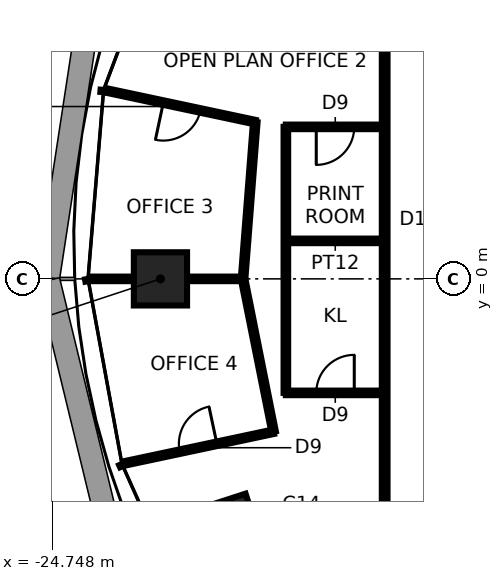
"""IFC4 building model, lengths in metres.
Left out: names, types, materials, properties, quantities, classifications, styles, units other than length and angle.
Written with IfcOpenShell. Run it as: python <this file> out.ifc"""

import sys

from ifc_helpers import new_model, si_unit, direction, frame, frame_2d, origin, origin_2d, place, context, subcontext, project, spatial, rectangle, extrude, element, fill, save


model = new_model("IFC4")
c1 = context("Model", 3, precision=1e-05, world=origin(), true_north=direction((0.0, 1.0)))
c2 = subcontext(c1, "Body", "Model", "MODEL_VIEW")
j1 = project(units=[si_unit("LENGTHUNIT", "METRE"), si_unit("PLANEANGLEUNIT", "RADIAN")], contexts=[c1])
p1 = place(None, origin())
s1 = spatial("IfcSite", under=j1, at=p1, CompositionType="ELEMENT")
p2 = place(p1, origin())
s2 = spatial("IfcBuilding", under=s1, at=p2, CompositionType="ELEMENT")
p3 = place(p2, frame((0.0, 0.0, 176.0)))
s3 = spatial("IfcBuildingStorey", under=s2, at=p3, CompositionType="ELEMENT", Elevation=176.0)
for number, where, z_axis, x_axis in (
    (1, (-20.808, 6.761, 0.0), (0.0, 0.0, 1.0), (-0.951, 0.309, 0.0)),
    (2, (-21.9, 0.0, 0.0), (0.0, 0.0, 1.0), (-1.0, 0.0, 0.0)),
    (3, (-20.109, -6.534, 0.0), (0.0, 0.0, 1.0), (-0.951, -0.309, 0.0)),
):
    element("IfcColumn", number, at=place(p3, frame(where, z_axis=z_axis, x_axis=x_axis)), inside=s3, PredefinedType="COLUMN", context=c2, shape_type="SweptSolid", body=[
        extrude(rectangle(XDim=1.4, YDim=1.4, at=origin_2d()), origin(), (0.0, 0.0, 1.0), 3.9),
    ])
p4 = place(p3, frame((-18.922, -4.022, 0.0), z_axis=(0.0, 0.0, 1.0), x_axis=(-0.195944435797, 0.980614999926, 0.0)))
e4 = element("IfcWall", 4, at=p4, inside=s3, PredefinedType="PARTITIONING", context=c2, shape_type="SweptSolid", body=[
    extrude(rectangle(XDim=4.102, YDim=0.12, at=frame_2d((2.051, 0.0))), origin(), (0.0, 0.0, 1.0), 3.74),
])
p5 = place(p3, frame((-18.6, -3.0, 0.0), z_axis=(0.0, 0.0, 1.0), x_axis=(1.0, 0.0, 0.0)))
e5 = element("IfcWall", 5, at=p5, inside=s3, PredefinedType="PARTITIONING", context=c2, shape_type="SweptSolid", body=[
    extrude(rectangle(XDim=2.6, YDim=0.12, at=frame_2d((1.3, 0.0))), origin(), (0.0, 0.0, 1.0), 3.74),
])
p6 = place(p5, frame((0.8, 0.0, 0.0)))
e6 = element("IfcOpeningElement", 6, at=p6, cuts=e5, PredefinedType="OPENING", context=c2, shape_type="SweptSolid", body=[
    extrude(rectangle(XDim=1.0, YDim=2.4, at=frame_2d((0.5, 1.2))), frame((0.0, 0.07, 0.0), z_axis=(0.0, -1.0, 0.0), x_axis=(1.0, 0.0, 0.0)), (0.0, 0.0, 1.0), 0.14),
])
p7 = place(p3, frame((-22.835, -4.854, 0.0), z_axis=(0.0, 0.0, 1.0), x_axis=(0.978152955943, 0.207886494942, 0.0)))
e7 = element("IfcWall", 7, at=p7, inside=s3, PredefinedType="PARTITIONING", context=c2, shape_type="SweptSolid", body=[
    extrude(rectangle(XDim=4.0, YDim=0.12, at=frame_2d((2.0, 0.0))), origin(), (0.0, 0.0, 1.0), 3.74),
])
p8 = place(p7, frame((1.474, 0.0, 0.0)))
e8 = element("IfcOpeningElement", 8, at=p8, cuts=e7, PredefinedType="OPENING", context=c2, shape_type="SweptSolid", body=[
    extrude(rectangle(XDim=1.0, YDim=2.4, at=frame_2d((0.5, 1.2))), frame((0.0, 0.07, 0.0), z_axis=(0.0, -1.0, 0.0), x_axis=(1.0, 0.0, 0.0)), (0.0, 0.0, 1.0), 0.14),
])
p9 = place(p3, frame((-16.0, 4.0, 0.0), z_axis=(0.0, 0.0, 1.0), x_axis=(-1.0, 0.0, 0.0)))
e9 = element("IfcWall", 9, at=p9, inside=s3, PredefinedType="PARTITIONING", context=c2, shape_type="SweptSolid", body=[
    extrude(rectangle(XDim=2.6, YDim=0.12, at=frame_2d((1.3, 0.0))), origin(), (0.0, 0.0, 1.0), 3.74),
])
p10 = place(p9, frame((0.8, 0.0, 0.0)))
e10 = element("IfcOpeningElement", 10, at=p10, cuts=e9, PredefinedType="OPENING", context=c2, shape_type="SweptSolid", body=[
    extrude(rectangle(XDim=1.0, YDim=2.4, at=frame_2d((0.5, 1.2))), frame((0.0, 0.07, 0.0), z_axis=(0.0, -1.0, 0.0), x_axis=(1.0, 0.0, 0.0)), (0.0, 0.0, 1.0), 0.14),
])
p11 = place(p3, frame((-19.405, 4.125, 0.0), z_axis=(0.0, 0.0, 1.0), x_axis=(-0.978140543132, 0.207944891454, 0.0)))
e11 = element("IfcWall", 11, at=p11, inside=s3, PredefinedType="PARTITIONING", context=c2, shape_type="SweptSolid", body=[
    extrude(rectangle(XDim=4.0, YDim=0.12, at=frame_2d((2.0, 0.0))), origin(), (0.0, 0.0, 1.0), 3.74),
])
p12 = place(p11, frame((1.474, 0.0, 0.0)))
e12 = element("IfcOpeningElement", 12, at=p12, cuts=e11, PredefinedType="OPENING", context=c2, shape_type="SweptSolid", body=[
    extrude(rectangle(XDim=1.0, YDim=2.4, at=frame_2d((0.5, 1.2))), frame((0.0, 0.07, 0.0), z_axis=(0.0, -1.0, 0.0), x_axis=(1.0, 0.0, 0.0)), (0.0, 0.0, 1.0), 0.14),
])
p13 = place(p3, frame((-19.726, 0.0, 0.0), z_axis=(0.0, 0.0, 1.0), x_axis=(0.077720864456, 0.996975158782, 0.0)))
e13 = element("IfcWall", 13, at=p13, inside=s3, PredefinedType="PARTITIONING", context=c2, shape_type="SweptSolid", body=[
    extrude(rectangle(XDim=4.137, YDim=0.12, at=frame_2d((2.068, 0.0))), origin(), (0.0, 0.0, 1.0), 3.74),
])
p14 = place(p3, frame((-18.6, 1.0, 0.0), z_axis=(0.0, 0.0, 1.0), x_axis=(1.0, 0.0, 0.0)))
e14 = element("IfcWall", 14, at=p14, inside=s3, PredefinedType="PARTITIONING", context=c2, shape_type="SweptSolid", body=[
    extrude(rectangle(XDim=2.6, YDim=0.12, at=frame_2d((1.3, 0.0))), origin(), (0.0, 0.0, 1.0), 3.74),
])
p15 = place(p3, frame((-18.6, 4.0, 0.0), z_axis=(0.0, 0.0, 1.0), x_axis=(0.0, -1.0, 0.0)))
e15 = element("IfcWall", 15, at=p15, inside=s3, PredefinedType="PARTITIONING", context=c2, shape_type="SweptSolid", body=[
    extrude(rectangle(XDim=7.0, YDim=0.12, at=frame_2d((3.5, 0.0))), origin(), (0.0, 0.0, 1.0), 3.74),
])
p16 = place(p3, frame((-19.726, 0.0, 0.0), z_axis=(0.0, 0.0, 1.0), x_axis=(-1.0, 0.0, 0.0)))
e16 = element("IfcWall", 16, at=p16, inside=s3, PredefinedType="PARTITIONING", context=c2, shape_type="SweptSolid", body=[
    extrude(rectangle(XDim=4.0, YDim=0.12, at=frame_2d((2.0, 0.0))), origin(), (0.0, 0.0, 1.0), 3.04),
])
p17 = place(p3, frame((-16.0, 11.3, 0.0), z_axis=(0.0, 0.0, 1.0), x_axis=(0.0, -1.0, 0.0)))
e17 = element("IfcWall", 17, at=p17, inside=s3, PredefinedType="PARTITIONING", context=c2, shape_type="SweptSolid", body=[
    extrude(rectangle(XDim=22.6, YDim=0.15, at=frame_2d((11.3, 0.0))), origin(), (0.0, 0.0, 1.0), 3.74),
])
p18 = place(p12, origin())
e18 = element("IfcDoor", 18, at=p18, inside=s3, OperationType="SINGLE_SWING_RIGHT", PredefinedType="DOOR", context=c2, shape_type="SweptSolid", body=[
    extrude(rectangle(XDim=1.0, YDim=2.4, at=frame_2d((0.5, 1.2))), frame((0.0, 0.025, 0.0), z_axis=(0.0, -1.0, 0.0), x_axis=(1.0, 0.0, 0.0)), (0.0, 0.0, 1.0), 0.05),
])
fill(e12, e18)
p19 = place(p8, origin())
e19 = element("IfcDoor", 19, at=p19, inside=s3, OperationType="SINGLE_SWING_RIGHT", PredefinedType="DOOR", context=c2, shape_type="SweptSolid", body=[
    extrude(rectangle(XDim=1.0, YDim=2.4, at=frame_2d((0.5, 1.2))), frame((0.0, 0.025, 0.0), z_axis=(0.0, -1.0, 0.0), x_axis=(1.0, 0.0, 0.0)), (0.0, 0.0, 1.0), 0.05),
])
fill(e8, e19)
p20 = place(p6, origin())
e20 = element("IfcDoor", 20, at=p20, inside=s3, OperationType="SINGLE_SWING_RIGHT", PredefinedType="DOOR", context=c2, shape_type="SweptSolid", body=[
    extrude(rectangle(XDim=1.0, YDim=2.4, at=frame_2d((0.5, 1.2))), frame((0.0, 0.025, 0.0), z_axis=(0.0, -1.0, 0.0), x_axis=(1.0, 0.0, 0.0)), (0.0, 0.0, 1.0), 0.05),
])
fill(e6, e20)
p21 = place(p10, origin())
e21 = element("IfcDoor", 21, at=p21, inside=s3, OperationType="SINGLE_SWING_RIGHT", PredefinedType="DOOR", context=c2, shape_type="SweptSolid", body=[
    extrude(rectangle(XDim=1.0, YDim=2.4, at=frame_2d((0.5, 1.2))), frame((0.0, 0.025, 0.0), z_axis=(0.0, -1.0, 0.0), x_axis=(1.0, 0.0, 0.0)), (0.0, 0.0, 1.0), 0.05),
])
fill(e10, e21)
save(model, sys.argv[1])
